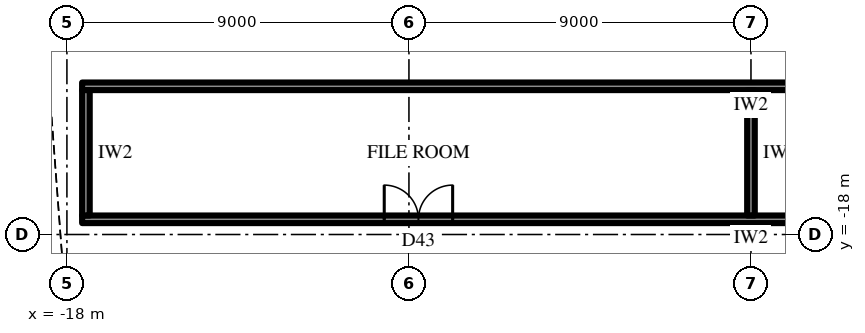
"""IFC4 building model, lengths in metres.
Left out: names, types, materials, properties, quantities, classifications, styles, units other than length and angle.
Written with IfcOpenShell. Run it as: python <this file> out.ifc"""

import sys

from ifc_helpers import new_model, si_unit, direction, frame, frame_2d, origin, place, context, subcontext, project, spatial, rectangle, extrude, element, fill, save


model = new_model("IFC4")
c1 = context("Model", 3, precision=1e-05, world=origin(), true_north=direction((0.0, 1.0)))
c2 = subcontext(c1, "Body", "Model", "MODEL_VIEW")
j1 = project(units=[si_unit("LENGTHUNIT", "METRE"), si_unit("PLANEANGLEUNIT", "RADIAN")], contexts=[c1])
p1 = place(None, origin())
s1 = spatial("IfcSite", under=j1, at=p1, CompositionType="ELEMENT")
p2 = place(p1, origin())
s2 = spatial("IfcBuilding", under=s1, at=p2, CompositionType="ELEMENT")
p3 = place(p2, frame((0.0, 0.0, 123.7)))
s3 = spatial("IfcBuildingStorey", under=s2, at=p3, CompositionType="ELEMENT", Elevation=123.7)
p4 = place(p3, frame((17.6, -14.1, 0.0), z_axis=(0.0, 0.0, 1.0), x_axis=(-1.0, 0.0, 0.0)))
e1 = element("IfcWall", 1, at=p4, inside=s3, PredefinedType="PARTITIONING", context=c2, shape_type="SweptSolid", body=[
    extrude(rectangle(XDim=35.2, YDim=0.2, at=frame_2d((17.6, 0.0))), origin(), (0.0, 0.0, 1.0), 4.0),
])
p5 = place(p3, frame((17.6, -17.6, 0.0), z_axis=(0.0, 0.0, 1.0), x_axis=(-1.0, 0.0, 0.0)))
e2 = element("IfcWall", 2, at=p5, inside=s3, PredefinedType="PARTITIONING", context=c2, shape_type="SweptSolid", body=[
    extrude(rectangle(XDim=35.2, YDim=0.2, at=frame_2d((17.6, 0.0))), origin(), (0.0, 0.0, 1.0), 4.0),
])
p6 = place(p5, frame((7.95, 0.0, 0.0)))
e3 = element("IfcOpeningElement", 3, at=p6, cuts=e2, PredefinedType="OPENING", context=c2, shape_type="SweptSolid", body=[
    extrude(rectangle(XDim=1.8, YDim=2.4, at=frame_2d((0.9, 1.2))), frame((0.0, 0.11, 0.0), z_axis=(0.0, -1.0, 0.0), x_axis=(1.0, 0.0, 0.0)), (0.0, 0.0, 1.0), 0.22),
])
p7 = place(p5, frame((25.45, 0.0, 0.0)))
e4 = element("IfcOpeningElement", 4, at=p7, cuts=e2, PredefinedType="OPENING", context=c2, shape_type="SweptSolid", body=[
    extrude(rectangle(XDim=1.8, YDim=2.4, at=frame_2d((0.9, 1.2))), frame((0.0, 0.11, 0.0), z_axis=(0.0, -1.0, 0.0), x_axis=(1.0, 0.0, 0.0)), (0.0, 0.0, 1.0), 0.22),
])
p8 = place(p3, frame((0.0, -14.2, 0.0), z_axis=(0.0, 0.0, 1.0), x_axis=(0.0, -1.0, 0.0)))
e5 = element("IfcWall", 5, at=p8, inside=s3, PredefinedType="PARTITIONING", context=c2, shape_type="SweptSolid", body=[
    extrude(rectangle(XDim=3.3, YDim=0.2, at=frame_2d((1.65, 0.0))), origin(), (0.0, 0.0, 1.0), 2.992),
])
p9 = place(p3, frame((-17.5, -14.2, 0.0), z_axis=(0.0, 0.0, 1.0), x_axis=(0.0, -1.0, 0.0)))
e6 = element("IfcWall", 6, at=p9, inside=s3, PredefinedType="PARTITIONING", context=c2, shape_type="SweptSolid", body=[
    extrude(rectangle(XDim=3.3, YDim=0.2, at=frame_2d((1.65, 0.0))), origin(), (0.0, 0.0, 1.0), 4.0),
])
p10 = place(p7, frame((1.8, 0.0, 0.0), z_axis=(0.0, 0.0, 1.0), x_axis=(-1.0, 0.0, 0.0)))
e7 = element("IfcDoor", 7, at=p10, inside=s3, OperationType="DOUBLE_DOOR_SINGLE_SWING", PredefinedType="DOOR", context=c2, shape_type="SweptSolid", body=[
    extrude(rectangle(XDim=1.8, YDim=2.4, at=frame_2d((0.9, 1.2))), frame((0.0, 0.025, 0.0), z_axis=(0.0, -1.0, 0.0), x_axis=(1.0, 0.0, 0.0)), (0.0, 0.0, 1.0), 0.05),
])
fill(e4, e7)
save(model, sys.argv[1])
